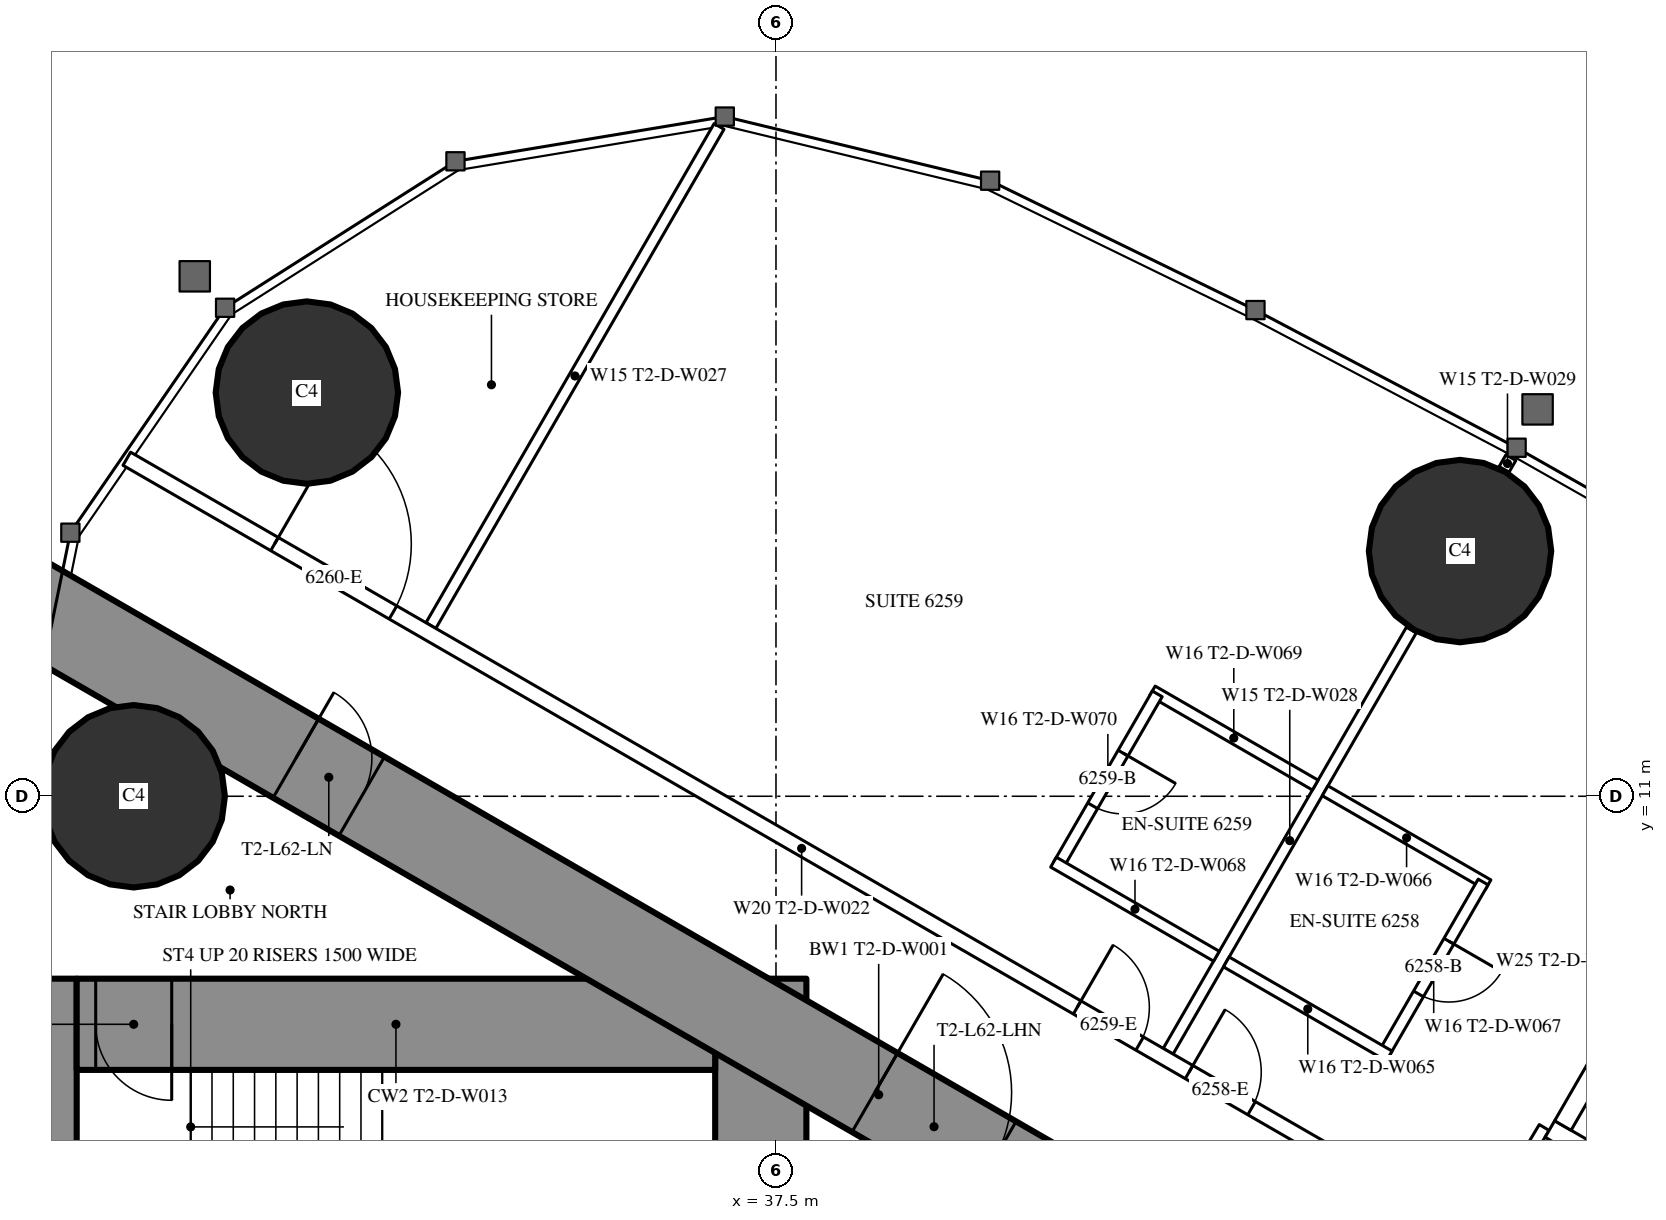
"""IFC4 building model, lengths in metres.
Left out: names, types, materials, properties, quantities, classifications, styles, units other than length and angle.
Written with IfcOpenShell. Run it as: python <this file> out.ifc"""

import sys

from ifc_helpers import new_model, si_unit, direction, frame, frame_2d, origin, origin_2d, place, context, subcontext, project, spatial, rectangle, circle, extrude, element, fill, save


model = new_model("IFC4")
c1 = context("Model", 3, precision=1e-05, world=origin(), true_north=direction((0.0, 1.0)))
c2 = subcontext(c1, "Body", "Model", "MODEL_VIEW")
j1 = project(units=[si_unit("LENGTHUNIT", "METRE"), si_unit("PLANEANGLEUNIT", "RADIAN")], contexts=[c1])
p1 = place(None, origin())
s1 = spatial("IfcSite", under=j1, at=p1, CompositionType="ELEMENT")
p2 = place(p1, origin())
s2 = spatial("IfcBuilding", under=s1, at=p2, CompositionType="ELEMENT")
p3 = place(p2, frame((0.0, 0.0, 233.3)))
s3 = spatial("IfcBuildingStorey", under=s2, at=p3, CompositionType="ELEMENT", Elevation=233.3)
for number, where, z_axis, x_axis in (
    (1, (31.328, 16.311, 0.0), (0.0, 0.0, 1.0), (1.0, 0.0, 0.0)),
    (2, (29.05, 11.0, 0.0), (0.0, 0.0, 1.0), (1.0, 0.0, 0.0)),
    (3, (46.499, 14.226, 0.0), (0.0, 0.0, 1.0), (1.0, 0.0, 0.0)),
):
    element("IfcColumn", number, at=place(p3, frame(where, z_axis=z_axis, x_axis=x_axis)), inside=s3, PredefinedType="COLUMN", context=c2, shape_type="SweptSolid", body=[
        extrude(circle(Radius=1.2, at=origin_2d()), origin(), (0.0, 0.0, 1.0), 3.6),
    ])
p4 = place(p3, frame((27.9, -8.6, 0.0), z_axis=(0.0, 0.0, 1.0), x_axis=(0.0, 1.0, 0.0)))
e4 = element("IfcWall", 4, at=p4, inside=s3, PredefinedType="SHEAR", context=c2, shape_type="SweptSolid", body=[
    extrude(rectangle(XDim=17.2, YDim=0.8, at=frame_2d((8.6, 0.0))), origin(), (0.0, 0.0, 1.0), 3.6),
])
p5 = place(p4, frame((9.35, 0.0, 0.0)))
e5 = element("IfcOpeningElement", 5, at=p5, cuts=e4, PredefinedType="OPENING", context=c2, shape_type="SweptSolid", body=[
    extrude(rectangle(XDim=0.9, YDim=2.2, at=frame_2d((0.45, 1.1))), frame((0.0, 0.41, 0.0), z_axis=(0.0, -1.0, 0.0), x_axis=(1.0, 0.0, 0.0)), (0.0, 0.0, 1.0), 0.82),
])
p6 = place(p3, frame((37.3, -8.6, 0.0), z_axis=(0.0, 0.0, 1.0), x_axis=(0.0, 1.0, 0.0)))
e6 = element("IfcWall", 6, at=p6, inside=s3, PredefinedType="SHEAR", context=c2, shape_type="SweptSolid", body=[
    extrude(rectangle(XDim=17.2, YDim=1.2, at=frame_2d((8.6, 0.0))), origin(), (0.0, 0.0, 1.0), 3.6),
])
p7 = place(p6, frame((7.7, 0.0, 0.0)))
e7 = element("IfcOpeningElement", 7, at=p7, cuts=e6, PredefinedType="OPENING", context=c2, shape_type="SweptSolid", body=[
    extrude(rectangle(XDim=1.8, YDim=2.2, at=frame_2d((0.9, 1.1))), frame((0.0, 0.61, 0.0), z_axis=(0.0, -1.0, 0.0), x_axis=(1.0, 0.0, 0.0)), (0.0, 0.0, 1.0), 1.22),
])
p8 = place(p3, frame((28.3, 8.0, 0.0), z_axis=(0.0, 0.0, 1.0), x_axis=(1.0, 0.0, 0.0)))
e8 = element("IfcWall", 8, at=p8, inside=s3, PredefinedType="SHEAR", context=c2, shape_type="SweptSolid", body=[
    extrude(rectangle(XDim=8.4, YDim=1.2, at=frame_2d((4.2, 0.0))), origin(), (0.0, 0.0, 1.0), 3.6),
])
p9 = place(p8, frame((0.25, 0.0, 0.0)))
e9 = element("IfcOpeningElement", 9, at=p9, cuts=e8, PredefinedType="OPENING", context=c2, shape_type="SweptSolid", body=[
    extrude(rectangle(XDim=1.0, YDim=2.2, at=frame_2d((0.5, 1.1))), frame((0.0, 0.61, 0.0), z_axis=(0.0, -1.0, 0.0), x_axis=(1.0, 0.0, 0.0)), (0.0, 0.0, 1.0), 1.22),
])
p10 = place(p3, frame((27.2, 13.8, 0.0), z_axis=(0.0, 0.0, 1.0), x_axis=(0.866024515034, -0.500001539357, 0.0)))
e10 = element("IfcWall", 10, at=p10, inside=s3, PredefinedType="SHEAR", context=c2, shape_type="SweptSolid", body=[
    extrude(rectangle(XDim=26.907, YDim=1.2, at=frame_2d((13.454, 0.0))), origin(), (0.0, 0.0, 1.0), 3.6),
])
p11 = place(p10, frame((4.6, 0.0, 0.0)))
e11 = element("IfcOpeningElement", 11, at=p11, cuts=e10, PredefinedType="OPENING", context=c2, shape_type="SweptSolid", body=[
    extrude(rectangle(XDim=1.0, YDim=2.2, at=frame_2d((0.5, 1.1))), frame((0.0, 0.61, 0.0), z_axis=(0.0, -1.0, 0.0), x_axis=(1.0, 0.0, 0.0)), (0.0, 0.0, 1.0), 1.22),
])
p12 = place(p10, frame((13.395, 0.0, 0.0)))
e12 = element("IfcOpeningElement", 12, at=p12, cuts=e10, PredefinedType="OPENING", context=c2, shape_type="SweptSolid", body=[
    extrude(rectangle(XDim=1.8, YDim=2.2, at=frame_2d((0.9, 1.1))), frame((0.0, 0.61, 0.0), z_axis=(0.0, -1.0, 0.0), x_axis=(1.0, 0.0, 0.0)), (0.0, 0.0, 1.0), 1.22),
])
p13 = place(p3, frame((32.96, 13.246, 0.0), z_axis=(0.0, 0.0, 1.0), x_axis=(0.500000236886, 0.866025267018, 0.0)))
e13 = element("IfcWall", 13, at=p13, inside=s3, PredefinedType="PARTITIONING", context=c2, shape_type="SweptSolid", body=[
    extrude(rectangle(XDim=7.583, YDim=0.15, at=frame_2d((3.791, 0.0))), origin(), (0.0, 0.0, 1.0), 3.35),
])
p14 = place(p3, frame((42.66, 7.646, 0.0), z_axis=(0.0, 0.0, 1.0), x_axis=(0.499996592859, 0.866027370889, 0.0)))
e14 = element("IfcWall", 14, at=p14, inside=s3, PredefinedType="PARTITIONING", context=c2, shape_type="SweptSolid", body=[
    extrude(rectangle(XDim=6.398, YDim=0.15, at=frame_2d((3.199, 0.0))), origin(), (0.0, 0.0, 1.0), 2.45),
])
p15 = place(p3, frame((47.079, 15.3, 0.0), z_axis=(0.0, 0.0, 1.0), x_axis=(0.499212083968, 0.866479829667, 0.0)))
e15 = element("IfcWall", 15, at=p15, inside=s3, PredefinedType="PARTITIONING", context=c2, shape_type="SweptSolid", body=[
    extrude(rectangle(XDim=0.179, YDim=0.15, at=frame_2d((0.09, 0.0))), origin(), (0.0, 0.0, 1.0), 2.45),
])
p16 = place(p3, frame((28.959, 15.44, 0.0), z_axis=(0.0, 0.0, 1.0), x_axis=(0.866028936079, -0.499993881836, 0.0)))
e16 = element("IfcWall", 16, at=p16, inside=s3, PredefinedType="PARTITIONING", context=c2, shape_type="SweptSolid", body=[
    extrude(rectangle(XDim=20.503, YDim=0.2, at=frame_2d((10.251, 0.0))), origin(), (0.0, 0.0, 1.0), 3.35),
])
p17 = place(p16, frame((16.137, 0.0, 0.0)))
e17 = element("IfcOpeningElement", 17, at=p17, cuts=e16, PredefinedType="OPENING", context=c2, shape_type="SweptSolid", body=[
    extrude(rectangle(XDim=0.95, YDim=2.2, at=frame_2d((0.475, 1.1))), frame((0.0, 0.11, 0.0), z_axis=(0.0, -1.0, 0.0), x_axis=(1.0, 0.0, 0.0)), (0.0, 0.0, 1.0), 0.22),
])
p18 = place(p16, frame((14.437, 0.0, 0.0)))
e18 = element("IfcOpeningElement", 18, at=p18, cuts=e16, PredefinedType="OPENING", context=c2, shape_type="SweptSolid", body=[
    extrude(rectangle(XDim=0.95, YDim=2.2, at=frame_2d((0.475, 1.1))), frame((0.0, 0.11, 0.0), z_axis=(0.0, -1.0, 0.0), x_axis=(1.0, 0.0, 0.0)), (0.0, 0.0, 1.0), 0.22),
])
p19 = place(p16, frame((2.244, 0.0, 0.0)))
e19 = element("IfcOpeningElement", 19, at=p19, cuts=e16, PredefinedType="OPENING", context=c2, shape_type="SweptSolid", body=[
    extrude(rectangle(XDim=1.8, YDim=2.03, at=frame_2d((0.9, 1.015))), frame((0.0, 0.11, 0.0), z_axis=(0.0, -1.0, 0.0), x_axis=(1.0, 0.0, 0.0)), (0.0, 0.0, 1.0), 0.22),
])
p20 = place(p3, frame((47.606, 6.642, 0.0), z_axis=(0.0, 0.0, 1.0), x_axis=(-0.51353662755, -0.858067673418, 0.0)))
e20 = element("IfcWall", 20, at=p20, inside=s3, PredefinedType="PARTITIONING", context=c2, shape_type="SweptSolid", body=[
    extrude(rectangle(XDim=1.91, YDim=0.15, at=frame_2d((0.955, 0.0))), origin(), (0.0, 0.0, 1.0), 3.35),
])
p21 = place(p3, frame((44.725, 11.072, 0.0), z_axis=(0.0, 0.0, 1.0), x_axis=(0.866006523861, -0.500032699561, 0.0)))
e21 = element("IfcWall", 21, at=p21, inside=s3, PredefinedType="PARTITIONING", context=c2, shape_type="SweptSolid", body=[
    extrude(rectangle(XDim=2.475, YDim=0.15, at=frame_2d((1.237, 0.0))), origin(), (0.0, 0.0, 1.0), 3.35),
])
p22 = place(p3, frame((45.503, 7.621, 0.0), z_axis=(0.0, 0.0, 1.0), x_axis=(0.500006934395, 0.866021400173, 0.0)))
e22 = element("IfcWall", 22, at=p22, inside=s3, PredefinedType="PARTITIONING", context=c2, shape_type="SweptSolid", body=[
    extrude(rectangle(XDim=2.6, YDim=0.15, at=frame_2d((1.3, 0.0))), origin(), (0.0, 0.0, 1.0), 3.35),
])
p23 = place(p22, frame((0.9, 0.0, 0.0)))
e23 = element("IfcOpeningElement", 23, at=p23, cuts=e22, PredefinedType="OPENING", context=c2, shape_type="SweptSolid", body=[
    extrude(rectangle(XDim=0.8, YDim=2.2, at=frame_2d((0.4, 1.1))), frame((0.0, 0.085, 0.0), z_axis=(0.0, -1.0, 0.0), x_axis=(1.0, 0.0, 0.0)), (0.0, 0.0, 1.0), 0.17),
])
p24 = place(p3, frame((43.425, 8.821, 0.0), z_axis=(0.0, 0.0, 1.0), x_axis=(0.866006523861, -0.500032699561, 0.0)))
e24 = element("IfcWall", 24, at=p24, inside=s3, PredefinedType="PARTITIONING", context=c2, shape_type="SweptSolid", body=[
    extrude(rectangle(XDim=2.475, YDim=0.15, at=frame_2d((1.237, 0.0))), origin(), (0.0, 0.0, 1.0), 2.5),
])
p25 = place(p3, frame((42.451, 12.385, 0.0), z_axis=(0.0, 0.0, 1.0), x_axis=(0.866031185235, -0.4999899861, 0.0)))
e25 = element("IfcWall", 25, at=p25, inside=s3, PredefinedType="PARTITIONING", context=c2, shape_type="SweptSolid", body=[
    extrude(rectangle(XDim=2.475, YDim=0.15, at=frame_2d((1.238, 0.0))), origin(), (0.0, 0.0, 1.0), 3.35),
])
p26 = place(p3, frame((41.216, 10.095, 0.0), z_axis=(0.0, 0.0, 1.0), x_axis=(0.499936506574, 0.866062058628, 0.0)))
e26 = element("IfcWall", 26, at=p26, inside=s3, PredefinedType="PARTITIONING", context=c2, shape_type="SweptSolid", body=[
    extrude(rectangle(XDim=2.6, YDim=0.15, at=frame_2d((1.3, 0.0))), origin(), (0.0, 0.0, 1.0), 3.35),
])
p27 = place(p26, frame((0.9, 0.0, 0.0)))
e27 = element("IfcOpeningElement", 27, at=p27, cuts=e26, PredefinedType="OPENING", context=c2, shape_type="SweptSolid", body=[
    extrude(rectangle(XDim=0.8, YDim=2.2, at=frame_2d((0.4, 1.1))), frame((0.0, 0.085, 0.0), z_axis=(0.0, -1.0, 0.0), x_axis=(1.0, 0.0, 0.0)), (0.0, 0.0, 1.0), 0.17),
])
p28 = place(p3, frame((41.151, 10.133, 0.0), z_axis=(0.0, 0.0, 1.0), x_axis=(0.866006523861, -0.500032699561, 0.0)))
e28 = element("IfcWall", 28, at=p28, inside=s3, PredefinedType="PARTITIONING", context=c2, shape_type="SweptSolid", body=[
    extrude(rectangle(XDim=2.475, YDim=0.15, at=frame_2d((1.237, 0.0))), origin(), (0.0, 0.0, 1.0), 2.5),
])
p29 = place(p3, frame((47.681, 6.622, 0.0), z_axis=(0.0, 0.0, 1.0), x_axis=(0.86603344179, -0.499986077507, 0.0)))
e29 = element("IfcWall", 29, at=p29, inside=s3, PredefinedType="PARTITIONING", context=c2, shape_type="SweptSolid", body=[
    extrude(rectangle(XDim=6.6, YDim=0.25, at=frame_2d((3.3, 0.0))), origin(), (0.0, 0.0, 1.0), 3.35),
])
p30 = place(p29, frame((0.75, 0.0, 0.0)))
e30 = element("IfcOpeningElement", 30, at=p30, cuts=e29, PredefinedType="OPENING", context=c2, shape_type="SweptSolid", body=[
    extrude(rectangle(XDim=1.1, YDim=2.2, at=frame_2d((0.55, 1.1))), frame((0.0, 0.135, 0.0), z_axis=(0.0, -1.0, 0.0), x_axis=(1.0, 0.0, 0.0)), (0.0, 0.0, 1.0), 0.27),
])
p31 = place(p29, frame((2.75, 0.0, 0.0)))
e31 = element("IfcOpeningElement", 31, at=p31, cuts=e29, PredefinedType="OPENING", context=c2, shape_type="SweptSolid", body=[
    extrude(rectangle(XDim=1.1, YDim=2.2, at=frame_2d((0.55, 1.1))), frame((0.0, 0.135, 0.0), z_axis=(0.0, -1.0, 0.0), x_axis=(1.0, 0.0, 0.0)), (0.0, 0.0, 1.0), 0.27),
])
p32 = place(p29, frame((4.75, 0.0, 0.0)))
e32 = element("IfcOpeningElement", 32, at=p32, cuts=e29, PredefinedType="OPENING", context=c2, shape_type="SweptSolid", body=[
    extrude(rectangle(XDim=1.1, YDim=2.2, at=frame_2d((0.55, 1.1))), frame((0.0, 0.135, 0.0), z_axis=(0.0, -1.0, 0.0), x_axis=(1.0, 0.0, 0.0)), (0.0, 0.0, 1.0), 0.27),
])
p33 = place(p3, frame((47.852, 6.668, 0.0), z_axis=(0.0, 0.0, 1.0), x_axis=(0.499929347863, 0.866066190972, 0.0)))
e33 = element("IfcWall", 33, at=p33, inside=s3, PredefinedType="PARTITIONING", context=c2, shape_type="SweptSolid", body=[
    extrude(rectangle(XDim=3.201, YDim=0.25, at=frame_2d((1.6, 0.0))), origin(), (0.0, 0.0, 1.0), 3.35),
])
p34 = place(p23, origin())
e34 = element("IfcDoor", 34, at=p34, inside=s3, OperationType="SINGLE_SWING_RIGHT", PredefinedType="DOOR", context=c2, shape_type="SweptSolid", body=[
    extrude(rectangle(XDim=0.8, YDim=2.2, at=frame_2d((0.4, 1.1))), frame((0.0, 0.025, 0.0), z_axis=(0.0, -1.0, 0.0), x_axis=(1.0, 0.0, 0.0)), (0.0, 0.0, 1.0), 0.05),
])
fill(e23, e34)
p35 = place(p17, origin())
e35 = element("IfcDoor", 35, at=p35, inside=s3, OperationType="SINGLE_SWING_LEFT", PredefinedType="DOOR", context=c2, shape_type="SweptSolid", body=[
    extrude(rectangle(XDim=0.95, YDim=2.2, at=frame_2d((0.475, 1.1))), frame((0.0, 0.025, 0.0), z_axis=(0.0, -1.0, 0.0), x_axis=(1.0, 0.0, 0.0)), (0.0, 0.0, 1.0), 0.05),
])
fill(e17, e35)
p36 = place(p27, origin())
e36 = element("IfcDoor", 36, at=p36, inside=s3, OperationType="SINGLE_SWING_RIGHT", PredefinedType="DOOR", context=c2, shape_type="SweptSolid", body=[
    extrude(rectangle(XDim=0.8, YDim=2.2, at=frame_2d((0.4, 1.1))), frame((0.0, 0.025, 0.0), z_axis=(0.0, -1.0, 0.0), x_axis=(1.0, 0.0, 0.0)), (0.0, 0.0, 1.0), 0.05),
])
fill(e27, e36)
p37 = place(p18, origin())
e37 = element("IfcDoor", 37, at=p37, inside=s3, OperationType="SINGLE_SWING_LEFT", PredefinedType="DOOR", context=c2, shape_type="SweptSolid", body=[
    extrude(rectangle(XDim=0.95, YDim=2.2, at=frame_2d((0.475, 1.1))), frame((0.0, 0.025, 0.0), z_axis=(0.0, -1.0, 0.0), x_axis=(1.0, 0.0, 0.0)), (0.0, 0.0, 1.0), 0.05),
])
fill(e18, e37)
p38 = place(p19, origin())
e38 = element("IfcDoor", 38, at=p38, inside=s3, OperationType="DOUBLE_DOOR_SINGLE_SWING", PredefinedType="DOOR", context=c2, shape_type="SweptSolid", body=[
    extrude(rectangle(XDim=1.8, YDim=2.03, at=frame_2d((0.9, 1.015))), frame((0.0, 0.025, 0.0), z_axis=(0.0, -1.0, 0.0), x_axis=(1.0, 0.0, 0.0)), (0.0, 0.0, 1.0), 0.05),
])
fill(e19, e38)
p39 = place(p11, origin())
e39 = element("IfcDoor", 39, at=p39, inside=s3, OperationType="SINGLE_SWING_LEFT", PredefinedType="DOOR", context=c2, shape_type="SweptSolid", body=[
    extrude(rectangle(XDim=1.0, YDim=2.2, at=frame_2d((0.5, 1.1))), frame((0.0, 0.025, 0.0), z_axis=(0.0, -1.0, 0.0), x_axis=(1.0, 0.0, 0.0)), (0.0, 0.0, 1.0), 0.05),
])
fill(e11, e39)
p40 = place(p12, origin())
e40 = element("IfcDoor", 40, at=p40, inside=s3, OperationType="DOUBLE_DOOR_SINGLE_SWING", PredefinedType="DOOR", context=c2, shape_type="SweptSolid", body=[
    extrude(rectangle(XDim=1.8, YDim=2.2, at=frame_2d((0.9, 1.1))), frame((0.0, 0.025, 0.0), z_axis=(0.0, -1.0, 0.0), x_axis=(1.0, 0.0, 0.0)), (0.0, 0.0, 1.0), 0.05),
])
fill(e12, e40)
p41 = place(p9, origin())
e41 = element("IfcDoor", 41, at=p41, inside=s3, OperationType="SINGLE_SWING_RIGHT", PredefinedType="DOOR", context=c2, shape_type="SweptSolid", body=[
    extrude(rectangle(XDim=1.0, YDim=2.2, at=frame_2d((0.5, 1.1))), frame((0.0, 0.025, 0.0), z_axis=(0.0, -1.0, 0.0), x_axis=(1.0, 0.0, 0.0)), (0.0, 0.0, 1.0), 0.05),
])
fill(e9, e41)
save(model, sys.argv[1])
